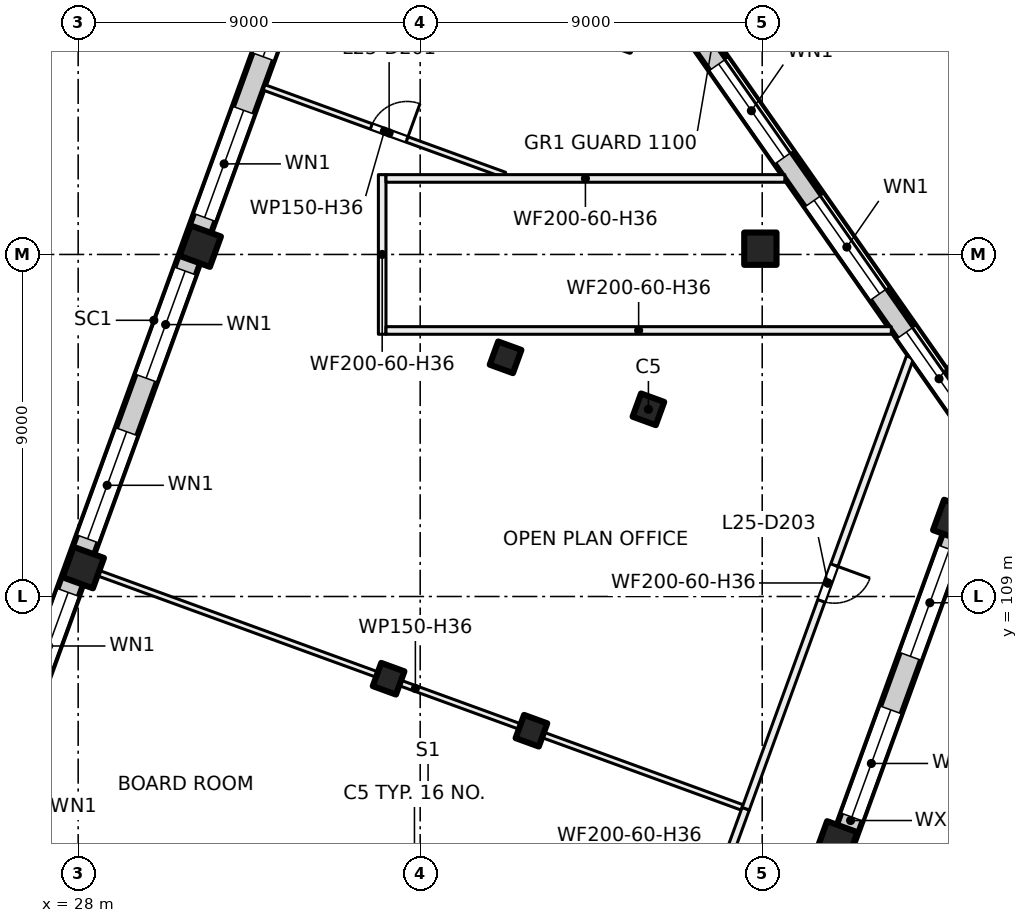
"""IFC4 building model, lengths in metres.
Left out: names, types, materials, properties, quantities, classifications, styles, units other than length and angle.
Written with IfcOpenShell. Run it as: python <this file> out.ifc"""

import sys

from ifc_helpers import new_model, si_unit, direction, frame, frame_2d, origin, origin_2d, place, context, subcontext, project, spatial, rectangle, extrude, element, fill, save


model = new_model("IFC4")
c1 = context("Model", 3, precision=1e-05, world=origin(), true_north=direction((0.0, 1.0)))
c2 = subcontext(c1, "Body", "Model", "MODEL_VIEW")
j1 = project(units=[si_unit("LENGTHUNIT", "METRE"), si_unit("PLANEANGLEUNIT", "RADIAN")], contexts=[c1])
p1 = place(None, origin())
s1 = spatial("IfcSite", under=j1, at=p1, CompositionType="ELEMENT")
p2 = place(p1, origin())
s2 = spatial("IfcBuilding", under=s1, at=p2, CompositionType="ELEMENT")
p3 = place(p2, frame((0.0, 0.0, 109.0)))
s3 = spatial("IfcBuildingStorey", under=s2, at=p3, CompositionType="ELEMENT", Elevation=109.0)
p4 = place(p3, frame((45.952, 118.152, 0.0), z_axis=(0.0, 0.0, 1.0), x_axis=(1.0, 0.0, 0.0)))
e1 = element("IfcColumn", 1, at=p4, inside=s3, PredefinedType="COLUMN", context=c2, shape_type="SweptSolid", body=[
    extrude(rectangle(XDim=0.85, YDim=0.85, at=origin_2d()), origin(), (0.0, 0.0, 1.0), 4.0),
])
for number, where, z_axis, x_axis in (
    (2, (43.006, 113.925, 0.0), (0.0, 0.0, 1.0), (-0.342, -0.94, 0.0)),
    (3, (39.927, 105.468, 0.0), (0.0, 0.0, 1.0), (-0.342, -0.94, 0.0)),
    (4, (39.247, 115.293, 0.0), (0.0, 0.0, 1.0), (-0.342, -0.94, 0.0)),
    (5, (36.169, 106.836, 0.0), (0.0, 0.0, 1.0), (-0.342, -0.94, 0.0)),
):
    element("IfcColumn", number, at=place(p3, frame(where, z_axis=z_axis, x_axis=x_axis)), inside=s3, PredefinedType="COLUMN", context=c2, shape_type="SweptSolid", body=[
        extrude(rectangle(XDim=0.65, YDim=0.65, at=origin_2d()), origin(), (0.0, 0.0, 1.0), 4.0),
    ])
for number, where, z_axis, x_axis in (
    (6, (51.04, 111.001, 0.0), (0.0, 0.0, 1.0), (-0.342, -0.94, 0.0)),
    (7, (47.962, 102.544, 0.0), (0.0, 0.0, 1.0), (-0.342, -0.94, 0.0)),
    (8, (31.212, 118.218, 0.0), (0.0, 0.0, 1.0), (-0.342, -0.94, 0.0)),
    (9, (28.134, 109.76, 0.0), (0.0, 0.0, 1.0), (-0.342, -0.94, 0.0)),
):
    element("IfcColumn", number, at=place(p3, frame(where, z_axis=z_axis, x_axis=x_axis)), inside=s3, PredefinedType="COLUMN", context=c2, shape_type="SweptSolid", body=[
        extrude(rectangle(XDim=0.85, YDim=0.85, at=origin_2d()), origin(), (0.0, 0.0, 1.0), 4.0),
    ])
p5 = place(p3, frame((58.083, 117.369, 0.0), z_axis=(0.0, 0.0, 1.0), x_axis=(-0.573573095716, 0.819154383416, 0.0)))
e10 = element("IfcWall", 10, at=p5, inside=s3, PredefinedType="SOLIDWALL", context=c2, shape_type="SweptSolid", body=[
    extrude(rectangle(XDim=26.037, YDim=0.6, at=frame_2d((13.019, 0.0))), origin(), (0.0, 0.0, 1.0), 3.625),
])
p6 = place(p5, frame((0.6, 0.0, 0.9)))
e11 = element("IfcOpeningElement", 11, at=p6, cuts=e10, PredefinedType="OPENING", context=c2, shape_type="SweptSolid", body=[
    extrude(rectangle(XDim=3.0, YDim=2.4, at=frame_2d((1.5, 1.2))), frame((0.0, 0.31, 0.0), z_axis=(0.0, -1.0, 0.0), x_axis=(1.0, 0.0, 0.0)), (0.0, 0.0, 1.0), 0.62),
])
p7 = place(p5, frame((4.829, 0.0, 0.9)))
e12 = element("IfcOpeningElement", 12, at=p7, cuts=e10, PredefinedType="OPENING", context=c2, shape_type="SweptSolid", body=[
    extrude(rectangle(XDim=3.0, YDim=2.4, at=frame_2d((1.5, 1.2))), frame((0.0, 0.31, 0.0), z_axis=(0.0, -1.0, 0.0), x_axis=(1.0, 0.0, 0.0)), (0.0, 0.0, 1.0), 0.62),
])
p8 = place(p5, frame((9.209, 0.0, 0.9)))
e13 = element("IfcOpeningElement", 13, at=p8, cuts=e10, PredefinedType="OPENING", context=c2, shape_type="SweptSolid", body=[
    extrude(rectangle(XDim=3.0, YDim=2.4, at=frame_2d((1.5, 1.2))), frame((0.0, 0.31, 0.0), z_axis=(0.0, -1.0, 0.0), x_axis=(1.0, 0.0, 0.0)), (0.0, 0.0, 1.0), 0.62),
])
p9 = place(p5, frame((13.588, 0.0, 0.9)))
e14 = element("IfcOpeningElement", 14, at=p9, cuts=e10, PredefinedType="OPENING", context=c2, shape_type="SweptSolid", body=[
    extrude(rectangle(XDim=3.0, YDim=2.4, at=frame_2d((1.5, 1.2))), frame((0.0, 0.31, 0.0), z_axis=(0.0, -1.0, 0.0), x_axis=(1.0, 0.0, 0.0)), (0.0, 0.0, 1.0), 0.62),
])
p10 = place(p5, frame((17.968, 0.0, 0.9)))
e15 = element("IfcOpeningElement", 15, at=p10, cuts=e10, PredefinedType="OPENING", context=c2, shape_type="SweptSolid", body=[
    extrude(rectangle(XDim=3.0, YDim=2.4, at=frame_2d((1.5, 1.2))), frame((0.0, 0.31, 0.0), z_axis=(0.0, -1.0, 0.0), x_axis=(1.0, 0.0, 0.0)), (0.0, 0.0, 1.0), 0.62),
])
p11 = place(p5, frame((22.198, 0.0, 0.9)))
e16 = element("IfcOpeningElement", 16, at=p11, cuts=e10, PredefinedType="OPENING", context=c2, shape_type="SweptSolid", body=[
    extrude(rectangle(XDim=3.0, YDim=2.4, at=frame_2d((1.5, 1.2))), frame((0.0, 0.31, 0.0), z_axis=(0.0, -1.0, 0.0), x_axis=(1.0, 0.0, 0.0)), (0.0, 0.0, 1.0), 0.62),
])
p12 = place(p3, frame((51.877, 112.862, 0.0), z_axis=(0.0, 0.0, 1.0), x_axis=(-0.342020589714, -0.939692458314, 0.0)))
e17 = element("IfcWall", 17, at=p12, inside=s3, PredefinedType="SOLIDWALL", context=c2, shape_type="SweptSolid", body=[
    extrude(rectangle(XDim=20.765, YDim=0.6, at=frame_2d((10.382, 0.0))), origin(), (0.0, 0.0, 1.0), 3.625),
])
p13 = place(p12, frame((2.785, 0.0, 0.9)))
e18 = element("IfcOpeningElement", 18, at=p13, cuts=e17, PredefinedType="OPENING", context=c2, shape_type="SweptSolid", body=[
    extrude(rectangle(XDim=3.0, YDim=2.4, at=frame_2d((1.5, 1.2))), frame((0.0, 0.31, 0.0), z_axis=(0.0, -1.0, 0.0), x_axis=(1.0, 0.0, 0.0)), (0.0, 0.0, 1.0), 0.62),
])
p14 = place(p12, frame((7.285, 0.0, 0.9)))
e19 = element("IfcOpeningElement", 19, at=p14, cuts=e17, PredefinedType="OPENING", context=c2, shape_type="SweptSolid", body=[
    extrude(rectangle(XDim=3.0, YDim=2.4, at=frame_2d((1.5, 1.2))), frame((0.0, 0.31, 0.0), z_axis=(0.0, -1.0, 0.0), x_axis=(1.0, 0.0, 0.0)), (0.0, 0.0, 1.0), 0.62),
])
p15 = place(p12, frame((11.785, 0.0, 0.9)))
e20 = element("IfcOpeningElement", 20, at=p15, cuts=e17, PredefinedType="OPENING", context=c2, shape_type="SweptSolid", body=[
    extrude(rectangle(XDim=3.0, YDim=2.4, at=frame_2d((1.5, 1.2))), frame((0.0, 0.31, 0.0), z_axis=(0.0, -1.0, 0.0), x_axis=(1.0, 0.0, 0.0)), (0.0, 0.0, 1.0), 0.62),
])
p16 = place(p12, frame((16.285, 0.0, 0.9)))
e21 = element("IfcOpeningElement", 21, at=p16, cuts=e17, PredefinedType="OPENING", context=c2, shape_type="SweptSolid", body=[
    extrude(rectangle(XDim=3.0, YDim=2.4, at=frame_2d((1.5, 1.2))), frame((0.0, 0.31, 0.0), z_axis=(0.0, -1.0, 0.0), x_axis=(1.0, 0.0, 0.0)), (0.0, 0.0, 1.0), 0.62),
])
p17 = place(p3, frame((36.923, 134.338, 0.0), z_axis=(0.0, 0.0, 1.0), x_axis=(0.573575266068, -0.819152863729, 0.0)))
e22 = element("IfcWall", 22, at=p17, inside=s3, PredefinedType="SOLIDWALL", context=c2, shape_type="SweptSolid", body=[
    extrude(rectangle(XDim=26.117, YDim=0.6, at=frame_2d((13.059, 0.0))), origin(), (0.0, 0.0, 1.0), 3.625),
])
p18 = place(p17, frame((0.84, 0.0, 0.9)))
e23 = element("IfcOpeningElement", 23, at=p18, cuts=e22, PredefinedType="OPENING", context=c2, shape_type="SweptSolid", body=[
    extrude(rectangle(XDim=3.0, YDim=2.4, at=frame_2d((1.5, 1.2))), frame((0.0, 0.31, 0.0), z_axis=(0.0, -1.0, 0.0), x_axis=(1.0, 0.0, 0.0)), (0.0, 0.0, 1.0), 0.62),
])
p19 = place(p17, frame((5.069, 0.0, 0.9)))
e24 = element("IfcOpeningElement", 24, at=p19, cuts=e22, PredefinedType="OPENING", context=c2, shape_type="SweptSolid", body=[
    extrude(rectangle(XDim=3.0, YDim=2.4, at=frame_2d((1.5, 1.2))), frame((0.0, 0.31, 0.0), z_axis=(0.0, -1.0, 0.0), x_axis=(1.0, 0.0, 0.0)), (0.0, 0.0, 1.0), 0.62),
])
p20 = place(p17, frame((9.449, 0.0, 0.9)))
e25 = element("IfcOpeningElement", 25, at=p20, cuts=e22, PredefinedType="OPENING", context=c2, shape_type="SweptSolid", body=[
    extrude(rectangle(XDim=3.0, YDim=2.4, at=frame_2d((1.5, 1.2))), frame((0.0, 0.31, 0.0), z_axis=(0.0, -1.0, 0.0), x_axis=(1.0, 0.0, 0.0)), (0.0, 0.0, 1.0), 0.62),
])
p21 = place(p17, frame((13.829, 0.0, 0.9)))
e26 = element("IfcOpeningElement", 26, at=p21, cuts=e22, PredefinedType="OPENING", context=c2, shape_type="SweptSolid", body=[
    extrude(rectangle(XDim=3.0, YDim=2.4, at=frame_2d((1.5, 1.2))), frame((0.0, 0.31, 0.0), z_axis=(0.0, -1.0, 0.0), x_axis=(1.0, 0.0, 0.0)), (0.0, 0.0, 1.0), 0.62),
])
p22 = place(p17, frame((18.208, 0.0, 0.9)))
e27 = element("IfcOpeningElement", 27, at=p22, cuts=e22, PredefinedType="OPENING", context=c2, shape_type="SweptSolid", body=[
    extrude(rectangle(XDim=3.0, YDim=2.4, at=frame_2d((1.5, 1.2))), frame((0.0, 0.31, 0.0), z_axis=(0.0, -1.0, 0.0), x_axis=(1.0, 0.0, 0.0)), (0.0, 0.0, 1.0), 0.62),
])
p23 = place(p17, frame((22.438, 0.0, 0.9)))
e28 = element("IfcOpeningElement", 28, at=p23, cuts=e22, PredefinedType="OPENING", context=c2, shape_type="SweptSolid", body=[
    extrude(rectangle(XDim=3.0, YDim=2.4, at=frame_2d((1.5, 1.2))), frame((0.0, 0.31, 0.0), z_axis=(0.0, -1.0, 0.0), x_axis=(1.0, 0.0, 0.0)), (0.0, 0.0, 1.0), 0.62),
])
p24 = place(p3, frame((24.666, 100.669, 0.0), z_axis=(0.0, 0.0, 1.0), x_axis=(0.34201964167, 0.939692803373, 0.0)))
e29 = element("IfcWall", 29, at=p24, inside=s3, PredefinedType="SOLIDWALL", context=c2, shape_type="SweptSolid", body=[
    extrude(rectangle(XDim=32.884, YDim=0.6, at=frame_2d((16.442, 0.0))), origin(), (0.0, 0.0, 1.0), 3.625),
])
p25 = place(p24, frame((1.48, 0.0, 0.9)))
e30 = element("IfcOpeningElement", 30, at=p25, cuts=e29, PredefinedType="OPENING", context=c2, shape_type="SweptSolid", body=[
    extrude(rectangle(XDim=3.0, YDim=2.4, at=frame_2d((1.5, 1.2))), frame((0.0, 0.31, 0.0), z_axis=(0.0, -1.0, 0.0), x_axis=(1.0, 0.0, 0.0)), (0.0, 0.0, 1.0), 0.62),
])
p26 = place(p24, frame((5.98, 0.0, 0.9)))
e31 = element("IfcOpeningElement", 31, at=p26, cuts=e29, PredefinedType="OPENING", context=c2, shape_type="SweptSolid", body=[
    extrude(rectangle(XDim=3.0, YDim=2.4, at=frame_2d((1.5, 1.2))), frame((0.0, 0.31, 0.0), z_axis=(0.0, -1.0, 0.0), x_axis=(1.0, 0.0, 0.0)), (0.0, 0.0, 1.0), 0.62),
])
p27 = place(p24, frame((10.48, 0.0, 0.9)))
e32 = element("IfcOpeningElement", 32, at=p27, cuts=e29, PredefinedType="OPENING", context=c2, shape_type="SweptSolid", body=[
    extrude(rectangle(XDim=3.0, YDim=2.4, at=frame_2d((1.5, 1.2))), frame((0.0, 0.31, 0.0), z_axis=(0.0, -1.0, 0.0), x_axis=(1.0, 0.0, 0.0)), (0.0, 0.0, 1.0), 0.62),
])
p28 = place(p24, frame((14.98, 0.0, 0.9)))
e33 = element("IfcOpeningElement", 33, at=p28, cuts=e29, PredefinedType="OPENING", context=c2, shape_type="SweptSolid", body=[
    extrude(rectangle(XDim=3.0, YDim=2.4, at=frame_2d((1.5, 1.2))), frame((0.0, 0.31, 0.0), z_axis=(0.0, -1.0, 0.0), x_axis=(1.0, 0.0, 0.0)), (0.0, 0.0, 1.0), 0.62),
])
p29 = place(p24, frame((19.48, 0.0, 0.9)))
e34 = element("IfcOpeningElement", 34, at=p29, cuts=e29, PredefinedType="OPENING", context=c2, shape_type="SweptSolid", body=[
    extrude(rectangle(XDim=3.0, YDim=2.4, at=frame_2d((1.5, 1.2))), frame((0.0, 0.31, 0.0), z_axis=(0.0, -1.0, 0.0), x_axis=(1.0, 0.0, 0.0)), (0.0, 0.0, 1.0), 0.62),
])
p30 = place(p24, frame((23.98, 0.0, 0.9)))
e35 = element("IfcOpeningElement", 35, at=p30, cuts=e29, PredefinedType="OPENING", context=c2, shape_type="SweptSolid", body=[
    extrude(rectangle(XDim=3.0, YDim=2.4, at=frame_2d((1.5, 1.2))), frame((0.0, 0.31, 0.0), z_axis=(0.0, -1.0, 0.0), x_axis=(1.0, 0.0, 0.0)), (0.0, 0.0, 1.0), 0.62),
])
p31 = place(p24, frame((28.48, 0.0, 0.9)))
e36 = element("IfcOpeningElement", 36, at=p31, cuts=e29, PredefinedType="OPENING", context=c2, shape_type="SweptSolid", body=[
    extrude(rectangle(XDim=3.0, YDim=2.4, at=frame_2d((1.5, 1.2))), frame((0.0, 0.31, 0.0), z_axis=(0.0, -1.0, 0.0), x_axis=(1.0, 0.0, 0.0)), (0.0, 0.0, 1.0), 0.62),
])
p32 = place(p3, frame((28.275, 109.709, 0.0), z_axis=(0.0, 0.0, 1.0), x_axis=(0.939695619185, -0.342011905181, 0.0)))
e37 = element("IfcWall", 37, at=p32, inside=s3, PredefinedType="PARTITIONING", context=c2, shape_type="SweptSolid", body=[
    extrude(rectangle(XDim=18.301, YDim=0.15, at=frame_2d((9.15, 0.0))), origin(), (0.0, 0.0, 1.0), 3.625),
])
p33 = place(p3, frame((39.223, 120.091, 0.0), z_axis=(0.0, 0.0, 1.0), x_axis=(-0.939705573142, 0.341984554924, 0.0)))
e38 = element("IfcWall", 38, at=p33, inside=s3, PredefinedType="PARTITIONING", context=c2, shape_type="SweptSolid", body=[
    extrude(rectangle(XDim=6.737, YDim=0.15, at=frame_2d((3.369, 0.0))), origin(), (0.0, 0.0, 1.0), 3.625),
])
p34 = place(p33, frame((2.735, 0.0, 0.0)))
e39 = element("IfcOpeningElement", 39, at=p34, cuts=e38, PredefinedType="OPENING", context=c2, shape_type="SweptSolid", body=[
    extrude(rectangle(XDim=1.0, YDim=2.1, at=frame_2d((0.5, 1.05))), frame((0.0, 0.085, 0.0), z_axis=(0.0, -1.0, 0.0), x_axis=(1.0, 0.0, 0.0)), (0.0, 0.0, 1.0), 0.17),
])
p35 = place(p3, frame((36.0, 115.9, 0.0), z_axis=(0.0, 0.0, 1.0), x_axis=(0.0, 1.0, 0.0)))
e40 = element("IfcWall", 40, at=p35, inside=s3, PredefinedType="PARTITIONING", context=c2, shape_type="SweptSolid", body=[
    extrude(rectangle(XDim=4.2, YDim=0.2, at=frame_2d((2.1, 0.0))), origin(), (0.0, 0.0, 1.0), 3.625),
])
p36 = place(p3, frame((36.1, 116.0, 0.0), z_axis=(0.0, 0.0, 1.0), x_axis=(1.0, 0.0, 0.0)))
e41 = element("IfcWall", 41, at=p36, inside=s3, PredefinedType="PARTITIONING", context=c2, shape_type="SweptSolid", body=[
    extrude(rectangle(XDim=13.297, YDim=0.2, at=frame_2d((6.648, 0.0))), origin(), (0.0, 0.0, 1.0), 3.625),
])
p37 = place(p3, frame((36.1, 120.0, 0.0), z_axis=(0.0, 0.0, 1.0), x_axis=(1.0, 0.0, 0.0)))
e42 = element("IfcWall", 42, at=p37, inside=s3, PredefinedType="PARTITIONING", context=c2, shape_type="SweptSolid", body=[
    extrude(rectangle(XDim=10.496, YDim=0.2, at=frame_2d((5.248, 0.0))), origin(), (0.0, 0.0, 1.0), 3.625),
])
p38 = place(p3, frame((43.549, 97.875, 0.0), z_axis=(0.0, 0.0, 1.0), x_axis=(0.342032265241, 0.939688208681, 0.0)))
e43 = element("IfcWall", 43, at=p38, inside=s3, PredefinedType="PARTITIONING", context=c2, shape_type="SweptSolid", body=[
    extrude(rectangle(XDim=5.897, YDim=0.2, at=frame_2d((2.948, 0.0))), origin(), (0.0, 0.0, 1.0), 3.625),
])
p39 = place(p3, frame((45.566, 103.416, 0.0), z_axis=(0.0, 0.0, 1.0), x_axis=(0.342023697047, 0.939691327329, 0.0)))
e44 = element("IfcWall", 44, at=p39, inside=s3, PredefinedType="PARTITIONING", context=c2, shape_type="SweptSolid", body=[
    extrude(rectangle(XDim=12.642, YDim=0.2, at=frame_2d((6.321, 0.0))), origin(), (0.0, 0.0, 1.0), 3.625),
])
p40 = place(p39, frame((5.819, 0.0, 0.0)))
e45 = element("IfcOpeningElement", 45, at=p40, cuts=e44, PredefinedType="OPENING", context=c2, shape_type="SweptSolid", body=[
    extrude(rectangle(XDim=1.0, YDim=2.1, at=frame_2d((0.5, 1.05))), frame((0.0, 0.11, 0.0), z_axis=(0.0, -1.0, 0.0), x_axis=(1.0, 0.0, 0.0)), (0.0, 0.0, 1.0), 0.22),
])
p41 = place(p13, origin())
e46 = element("IfcWindow", 46, at=p41, inside=s3, PartitioningType="SINGLE_PANEL", PredefinedType="WINDOW", context=c2, shape_type="SweptSolid", body=[
    extrude(rectangle(XDim=3.0, YDim=2.4, at=frame_2d((1.5, 1.2))), frame((0.0, 0.03, 0.0), z_axis=(0.0, -1.0, 0.0), x_axis=(1.0, 0.0, 0.0)), (0.0, 0.0, 1.0), 0.06),
])
fill(e18, e46)
p42 = place(p14, origin())
e47 = element("IfcWindow", 47, at=p42, inside=s3, PartitioningType="SINGLE_PANEL", PredefinedType="WINDOW", context=c2, shape_type="SweptSolid", body=[
    extrude(rectangle(XDim=3.0, YDim=2.4, at=frame_2d((1.5, 1.2))), frame((0.0, 0.03, 0.0), z_axis=(0.0, -1.0, 0.0), x_axis=(1.0, 0.0, 0.0)), (0.0, 0.0, 1.0), 0.06),
])
fill(e19, e47)
p43 = place(p21, origin())
e48 = element("IfcWindow", 48, at=p43, inside=s3, PartitioningType="SINGLE_PANEL", PredefinedType="WINDOW", context=c2, shape_type="SweptSolid", body=[
    extrude(rectangle(XDim=3.0, YDim=2.4, at=frame_2d((1.5, 1.2))), frame((0.0, 0.03, 0.0), z_axis=(0.0, -1.0, 0.0), x_axis=(1.0, 0.0, 0.0)), (0.0, 0.0, 1.0), 0.06),
])
fill(e26, e48)
p44 = place(p22, origin())
e49 = element("IfcWindow", 49, at=p44, inside=s3, PartitioningType="SINGLE_PANEL", PredefinedType="WINDOW", context=c2, shape_type="SweptSolid", body=[
    extrude(rectangle(XDim=3.0, YDim=2.4, at=frame_2d((1.5, 1.2))), frame((0.0, 0.03, 0.0), z_axis=(0.0, -1.0, 0.0), x_axis=(1.0, 0.0, 0.0)), (0.0, 0.0, 1.0), 0.06),
])
fill(e27, e49)
p45 = place(p23, origin())
e50 = element("IfcWindow", 50, at=p45, inside=s3, PartitioningType="SINGLE_PANEL", PredefinedType="WINDOW", context=c2, shape_type="SweptSolid", body=[
    extrude(rectangle(XDim=3.0, YDim=2.4, at=frame_2d((1.5, 1.2))), frame((0.0, 0.03, 0.0), z_axis=(0.0, -1.0, 0.0), x_axis=(1.0, 0.0, 0.0)), (0.0, 0.0, 1.0), 0.06),
])
fill(e28, e50)
p46 = place(p26, origin())
e51 = element("IfcWindow", 51, at=p46, inside=s3, PartitioningType="SINGLE_PANEL", PredefinedType="WINDOW", context=c2, shape_type="SweptSolid", body=[
    extrude(rectangle(XDim=3.0, YDim=2.4, at=frame_2d((1.5, 1.2))), frame((0.0, 0.03, 0.0), z_axis=(0.0, -1.0, 0.0), x_axis=(1.0, 0.0, 0.0)), (0.0, 0.0, 1.0), 0.06),
])
fill(e31, e51)
p47 = place(p27, origin())
e52 = element("IfcWindow", 52, at=p47, inside=s3, PartitioningType="SINGLE_PANEL", PredefinedType="WINDOW", context=c2, shape_type="SweptSolid", body=[
    extrude(rectangle(XDim=3.0, YDim=2.4, at=frame_2d((1.5, 1.2))), frame((0.0, 0.03, 0.0), z_axis=(0.0, -1.0, 0.0), x_axis=(1.0, 0.0, 0.0)), (0.0, 0.0, 1.0), 0.06),
])
fill(e32, e52)
p48 = place(p28, origin())
e53 = element("IfcWindow", 53, at=p48, inside=s3, PartitioningType="SINGLE_PANEL", PredefinedType="WINDOW", context=c2, shape_type="SweptSolid", body=[
    extrude(rectangle(XDim=3.0, YDim=2.4, at=frame_2d((1.5, 1.2))), frame((0.0, 0.03, 0.0), z_axis=(0.0, -1.0, 0.0), x_axis=(1.0, 0.0, 0.0)), (0.0, 0.0, 1.0), 0.06),
])
fill(e33, e53)
p49 = place(p29, origin())
e54 = element("IfcWindow", 54, at=p49, inside=s3, PartitioningType="SINGLE_PANEL", PredefinedType="WINDOW", context=c2, shape_type="SweptSolid", body=[
    extrude(rectangle(XDim=3.0, YDim=2.4, at=frame_2d((1.5, 1.2))), frame((0.0, 0.03, 0.0), z_axis=(0.0, -1.0, 0.0), x_axis=(1.0, 0.0, 0.0)), (0.0, 0.0, 1.0), 0.06),
])
fill(e34, e54)
p50 = place(p30, origin())
e55 = element("IfcWindow", 55, at=p50, inside=s3, PartitioningType="SINGLE_PANEL", PredefinedType="WINDOW", context=c2, shape_type="SweptSolid", body=[
    extrude(rectangle(XDim=3.0, YDim=2.4, at=frame_2d((1.5, 1.2))), frame((0.0, 0.03, 0.0), z_axis=(0.0, -1.0, 0.0), x_axis=(1.0, 0.0, 0.0)), (0.0, 0.0, 1.0), 0.06),
])
fill(e35, e55)
p51 = place(p34, origin())
e56 = element("IfcDoor", 56, at=p51, inside=s3, OperationType="SINGLE_SWING_LEFT", PredefinedType="DOOR", context=c2, shape_type="SweptSolid", body=[
    extrude(rectangle(XDim=1.0, YDim=2.1, at=frame_2d((0.5, 1.05))), frame((0.0, 0.025, 0.0), z_axis=(0.0, -1.0, 0.0), x_axis=(1.0, 0.0, 0.0)), (0.0, 0.0, 1.0), 0.05),
])
fill(e39, e56)
p52 = place(p40, origin())
e57 = element("IfcDoor", 57, at=p52, inside=s3, OperationType="SINGLE_SWING_RIGHT", PredefinedType="DOOR", context=c2, shape_type="SweptSolid", body=[
    extrude(rectangle(XDim=1.0, YDim=2.1, at=frame_2d((0.5, 1.05))), frame((0.0, 0.025, 0.0), z_axis=(0.0, -1.0, 0.0), x_axis=(1.0, 0.0, 0.0)), (0.0, 0.0, 1.0), 0.05),
])
fill(e45, e57)
save(model, sys.argv[1])
